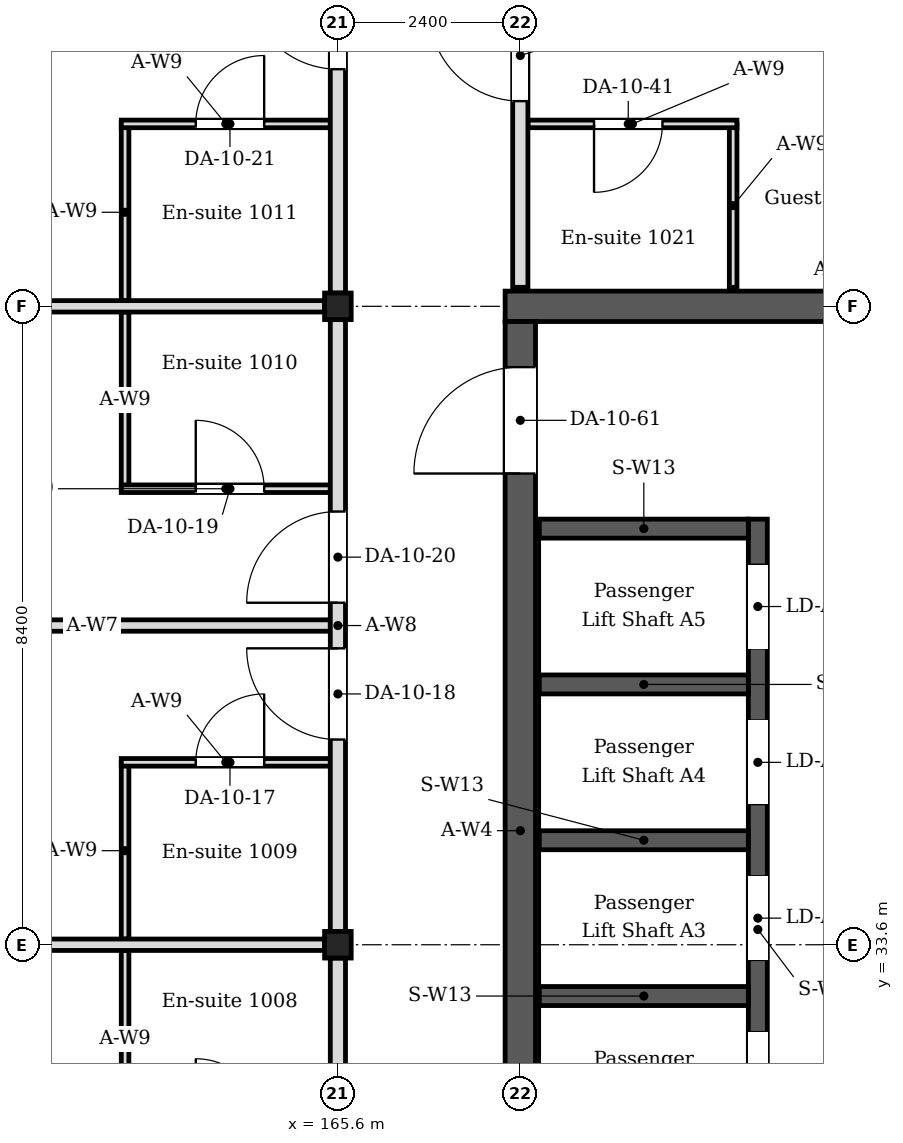
"""IFC4 building model, lengths in metres.
Left out: names, types, materials, properties, quantities, classifications, styles, units other than length and angle.
Written with IfcOpenShell. Run it as: python <this file> out.ifc"""

import sys

from ifc_helpers import new_model, si_unit, direction, frame, frame_2d, origin, origin_2d, place, context, subcontext, project, spatial, rectangle, i_section, extrude, element, fill, save


model = new_model("IFC4")
c1 = context("Model", 3, precision=1e-05, world=origin(), true_north=direction((0.0, 1.0)))
c2 = subcontext(c1, "Body", "Model", "MODEL_VIEW")
j1 = project(units=[si_unit("LENGTHUNIT", "METRE"), si_unit("PLANEANGLEUNIT", "RADIAN")], contexts=[c1])
p1 = place(None, origin())
s1 = spatial("IfcSite", under=j1, at=p1, CompositionType="ELEMENT")
p2 = place(p1, origin())
s2 = spatial("IfcBuilding", under=s1, at=p2, CompositionType="ELEMENT")
p3 = place(p2, frame((0.0, 0.0, 43.8)))
s3 = spatial("IfcBuildingStorey", under=s2, at=p3, CompositionType="ELEMENT", Elevation=43.8)
for number, where, z_axis, x_axis in (
    (1, (165.6, 33.6, 0.0), (0.0, 0.0, 1.0), (1.0, 0.0, 0.0)),
    (2, (165.6, 42.0, 0.0), (0.0, 0.0, 1.0), (1.0, 0.0, 0.0)),
):
    element("IfcColumn", number, at=place(p3, frame(where, z_axis=z_axis, x_axis=x_axis)), inside=s3, PredefinedType="COLUMN", context=c2, shape_type="SweptSolid", body=[
        extrude(i_section(OverallWidth=0.35, OverallDepth=0.35, WebThickness=0.012, FlangeThickness=0.019, FilletRadius=0.013, at=origin_2d()), origin(), (0.0, 0.0, 1.0), 4.2),
    ])
p4 = place(p3, frame((167.8, 42.0, 0.0), z_axis=(0.0, 0.0, 1.0), x_axis=(1.0, 0.0, 0.0)))
e3 = element("IfcWall", 3, at=p4, inside=s3, PredefinedType="SOLIDWALL", context=c2, shape_type="SweptSolid", body=[
    extrude(rectangle(XDim=8.8, YDim=0.4, at=frame_2d((4.4, 0.0))), origin(), (0.0, 0.0, 1.0), 4.05),
])
p5 = place(p3, frame((168.0, 25.4, 0.0), z_axis=(0.0, 0.0, 1.0), x_axis=(0.0, 1.0, 0.0)))
e4 = element("IfcWall", 4, at=p5, inside=s3, PredefinedType="SOLIDWALL", context=c2, shape_type="SweptSolid", body=[
    extrude(rectangle(XDim=16.4, YDim=0.4, at=frame_2d((8.2, 0.0))), origin(), (0.0, 0.0, 1.0), 4.05),
])
p6 = place(p5, frame((1.0, 0.0, 0.0)))
e5 = element("IfcOpeningElement", 5, at=p6, cuts=e4, PredefinedType="OPENING", context=c2, shape_type="SweptSolid", body=[
    extrude(rectangle(XDim=1.0, YDim=2.1, at=frame_2d((0.5, 1.05))), frame((0.0, 0.21, 0.0), z_axis=(0.0, -1.0, 0.0), x_axis=(1.0, 0.0, 0.0)), (0.0, 0.0, 1.0), 0.42),
])
p7 = place(p5, frame((14.4, 0.0, 0.0)))
e6 = element("IfcOpeningElement", 6, at=p7, cuts=e4, PredefinedType="OPENING", context=c2, shape_type="SweptSolid", body=[
    extrude(rectangle(XDim=1.4, YDim=2.1, at=frame_2d((0.7, 1.05))), frame((0.0, 0.21, 0.0), z_axis=(0.0, -1.0, 0.0), x_axis=(1.0, 0.0, 0.0)), (0.0, 0.0, 1.0), 0.42),
])
for number, where, z_axis, x_axis in (
    (7, (162.8, 31.2, 0.0), (0.0, 0.0, 1.0), (0.0, 1.0, 0.0)),
    (8, (162.8, 33.675, 0.0), (0.0, 0.0, 1.0), (0.0, 1.0, 0.0)),
):
    element("IfcWall", number, at=place(p3, frame(where, z_axis=z_axis, x_axis=x_axis)), inside=s3, PredefinedType="PARTITIONING", context=c2, shape_type="SweptSolid", body=[
        extrude(rectangle(XDim=2.325, YDim=0.1, at=frame_2d((1.163, 0.0))), origin(), (0.0, 0.0, 1.0), 4.05),
    ])
p8 = place(p3, frame((162.75, 36.0, 0.0), z_axis=(0.0, 0.0, 1.0), x_axis=(1.0, 0.0, 0.0)))
e9 = element("IfcWall", 9, at=p8, inside=s3, PredefinedType="PARTITIONING", context=c2, shape_type="SweptSolid", body=[
    extrude(rectangle(XDim=2.75, YDim=0.1, at=frame_2d((1.375, 0.0))), origin(), (0.0, 0.0, 1.0), 4.05),
])
p9 = place(p8, frame((0.98, 0.0, 0.0)))
e10 = element("IfcOpeningElement", 10, at=p9, cuts=e9, PredefinedType="OPENING", context=c2, shape_type="SweptSolid", body=[
    extrude(rectangle(XDim=0.9, YDim=2.1, at=frame_2d((0.45, 1.05))), frame((0.0, 0.06, 0.0), z_axis=(0.0, -1.0, 0.0), x_axis=(1.0, 0.0, 0.0)), (0.0, 0.0, 1.0), 0.12),
])
p10 = place(p3, frame((162.8, 39.6, 0.0), z_axis=(0.0, 0.0, 1.0), x_axis=(0.0, 1.0, 0.0)))
e11 = element("IfcWall", 11, at=p10, inside=s3, PredefinedType="PARTITIONING", context=c2, shape_type="SweptSolid", body=[
    extrude(rectangle(XDim=2.325, YDim=0.1, at=frame_2d((1.163, 0.0))), origin(), (0.0, 0.0, 1.0), 4.05),
])
p11 = place(p3, frame((162.75, 39.6, 0.0), z_axis=(0.0, 0.0, 1.0), x_axis=(1.0, 0.0, 0.0)))
e12 = element("IfcWall", 12, at=p11, inside=s3, PredefinedType="PARTITIONING", context=c2, shape_type="SweptSolid", body=[
    extrude(rectangle(XDim=2.75, YDim=0.1, at=frame_2d((1.375, 0.0))), origin(), (0.0, 0.0, 1.0), 4.05),
])
p12 = place(p11, frame((0.98, 0.0, 0.0)))
e13 = element("IfcOpeningElement", 13, at=p12, cuts=e12, PredefinedType="OPENING", context=c2, shape_type="SweptSolid", body=[
    extrude(rectangle(XDim=0.9, YDim=2.1, at=frame_2d((0.45, 1.05))), frame((0.0, 0.06, 0.0), z_axis=(0.0, -1.0, 0.0), x_axis=(1.0, 0.0, 0.0)), (0.0, 0.0, 1.0), 0.12),
])
p13 = place(p3, frame((162.8, 42.075, 0.0), z_axis=(0.0, 0.0, 1.0), x_axis=(0.0, 1.0, 0.0)))
e14 = element("IfcWall", 14, at=p13, inside=s3, PredefinedType="PARTITIONING", context=c2, shape_type="SweptSolid", body=[
    extrude(rectangle(XDim=2.325, YDim=0.1, at=frame_2d((1.163, 0.0))), origin(), (0.0, 0.0, 1.0), 4.05),
])
p14 = place(p3, frame((162.75, 44.4, 0.0), z_axis=(0.0, 0.0, 1.0), x_axis=(1.0, 0.0, 0.0)))
e15 = element("IfcWall", 15, at=p14, inside=s3, PredefinedType="PARTITIONING", context=c2, shape_type="SweptSolid", body=[
    extrude(rectangle(XDim=2.75, YDim=0.1, at=frame_2d((1.375, 0.0))), origin(), (0.0, 0.0, 1.0), 4.05),
])
p15 = place(p14, frame((0.98, 0.0, 0.0)))
e16 = element("IfcOpeningElement", 16, at=p15, cuts=e15, PredefinedType="OPENING", context=c2, shape_type="SweptSolid", body=[
    extrude(rectangle(XDim=0.9, YDim=2.1, at=frame_2d((0.45, 1.05))), frame((0.0, 0.06, 0.0), z_axis=(0.0, -1.0, 0.0), x_axis=(1.0, 0.0, 0.0)), (0.0, 0.0, 1.0), 0.12),
])
p16 = place(p3, frame((170.8, 42.25, 0.0), z_axis=(0.0, 0.0, 1.0), x_axis=(0.0, 1.0, 0.0)))
e17 = element("IfcWall", 17, at=p16, inside=s3, PredefinedType="PARTITIONING", context=c2, shape_type="SweptSolid", body=[
    extrude(rectangle(XDim=2.15, YDim=0.1, at=frame_2d((1.075, 0.0))), origin(), (0.0, 0.0, 1.0), 4.05),
])
p17 = place(p3, frame((170.85, 44.4, 0.0), z_axis=(0.0, 0.0, 1.0), x_axis=(-1.0, 0.0, 0.0)))
e18 = element("IfcWall", 18, at=p17, inside=s3, PredefinedType="PARTITIONING", context=c2, shape_type="SweptSolid", body=[
    extrude(rectangle(XDim=2.75, YDim=0.1, at=frame_2d((1.375, 0.0))), origin(), (0.0, 0.0, 1.0), 4.05),
])
p18 = place(p17, frame((0.98, 0.0, 0.0)))
e19 = element("IfcOpeningElement", 19, at=p18, cuts=e18, PredefinedType="OPENING", context=c2, shape_type="SweptSolid", body=[
    extrude(rectangle(XDim=0.9, YDim=2.1, at=frame_2d((0.45, 1.05))), frame((0.0, 0.06, 0.0), z_axis=(0.0, -1.0, 0.0), x_axis=(1.0, 0.0, 0.0)), (0.0, 0.0, 1.0), 0.12),
])
for number, where, z_axis, x_axis in (
    (20, (157.375, 33.6, 0.0), (0.0, 0.0, 1.0), (1.0, 0.0, 0.0)),
    (21, (157.375, 42.0, 0.0), (0.0, 0.0, 1.0), (1.0, 0.0, 0.0)),
):
    element("IfcWall", number, at=place(p3, frame(where, z_axis=z_axis, x_axis=x_axis)), inside=s3, PredefinedType="PARTITIONING", context=c2, shape_type="SweptSolid", body=[
        extrude(rectangle(XDim=8.05, YDim=0.15, at=frame_2d((4.025, 0.0))), origin(), (0.0, 0.0, 1.0), 3.604),
    ])
p19 = place(p3, frame((159.24, 37.8, 0.0), z_axis=(0.0, 0.0, 1.0), x_axis=(1.0, 0.0, 0.0)))
e22 = element("IfcWall", 22, at=p19, inside=s3, PredefinedType="PARTITIONING", context=c2, shape_type="SweptSolid", body=[
    extrude(rectangle(XDim=6.26, YDim=0.15, at=frame_2d((3.13, 0.0))), origin(), (0.0, 0.0, 1.0), 3.604),
])
p20 = place(p3, frame((165.6, 25.375, 0.0), z_axis=(0.0, 0.0, 1.0), x_axis=(0.0, 1.0, 0.0)))
e23 = element("IfcWall", 23, at=p20, inside=s3, PredefinedType="PARTITIONING", context=c2, shape_type="SweptSolid", body=[
    extrude(rectangle(XDim=8.05, YDim=0.2, at=frame_2d((4.025, 0.0))), origin(), (0.0, 0.0, 1.0), 3.45),
])
p21 = place(p20, frame((2.525, 0.0, 0.0)))
e24 = element("IfcOpeningElement", 24, at=p21, cuts=e23, PredefinedType="OPENING", context=c2, shape_type="SweptSolid", body=[
    extrude(rectangle(XDim=1.2, YDim=2.1, at=frame_2d((0.6, 1.05))), frame((0.0, 0.11, 0.0), z_axis=(0.0, -1.0, 0.0), x_axis=(1.0, 0.0, 0.0)), (0.0, 0.0, 1.0), 0.22),
])
p22 = place(p20, frame((4.325, 0.0, 0.0)))
e25 = element("IfcOpeningElement", 25, at=p22, cuts=e23, PredefinedType="OPENING", context=c2, shape_type="SweptSolid", body=[
    extrude(rectangle(XDim=1.2, YDim=2.1, at=frame_2d((0.6, 1.05))), frame((0.0, 0.11, 0.0), z_axis=(0.0, -1.0, 0.0), x_axis=(1.0, 0.0, 0.0)), (0.0, 0.0, 1.0), 0.22),
])
p23 = place(p3, frame((165.6, 33.775, 0.0), z_axis=(0.0, 0.0, 1.0), x_axis=(0.0, 1.0, 0.0)))
e26 = element("IfcWall", 26, at=p23, inside=s3, PredefinedType="PARTITIONING", context=c2, shape_type="SweptSolid", body=[
    extrude(rectangle(XDim=8.05, YDim=0.2, at=frame_2d((4.025, 0.0))), origin(), (0.0, 0.0, 1.0), 3.45),
])
p24 = place(p23, frame((2.525, 0.0, 0.0)))
e27 = element("IfcOpeningElement", 27, at=p24, cuts=e26, PredefinedType="OPENING", context=c2, shape_type="SweptSolid", body=[
    extrude(rectangle(XDim=1.2, YDim=2.1, at=frame_2d((0.6, 1.05))), frame((0.0, 0.11, 0.0), z_axis=(0.0, -1.0, 0.0), x_axis=(1.0, 0.0, 0.0)), (0.0, 0.0, 1.0), 0.22),
])
p25 = place(p23, frame((4.325, 0.0, 0.0)))
e28 = element("IfcOpeningElement", 28, at=p25, cuts=e26, PredefinedType="OPENING", context=c2, shape_type="SweptSolid", body=[
    extrude(rectangle(XDim=1.2, YDim=2.1, at=frame_2d((0.6, 1.05))), frame((0.0, 0.11, 0.0), z_axis=(0.0, -1.0, 0.0), x_axis=(1.0, 0.0, 0.0)), (0.0, 0.0, 1.0), 0.22),
])
p26 = place(p3, frame((165.6, 42.175, 0.0), z_axis=(0.0, 0.0, 1.0), x_axis=(0.0, 1.0, 0.0)))
e29 = element("IfcWall", 29, at=p26, inside=s3, PredefinedType="PARTITIONING", context=c2, shape_type="SweptSolid", body=[
    extrude(rectangle(XDim=8.05, YDim=0.2, at=frame_2d((4.025, 0.0))), origin(), (0.0, 0.0, 1.0), 3.45),
])
p27 = place(p26, frame((2.945, 0.0, 0.0)))
e30 = element("IfcOpeningElement", 30, at=p27, cuts=e29, PredefinedType="OPENING", context=c2, shape_type="SweptSolid", body=[
    extrude(rectangle(XDim=1.2, YDim=2.1, at=frame_2d((0.6, 1.05))), frame((0.0, 0.11, 0.0), z_axis=(0.0, -1.0, 0.0), x_axis=(1.0, 0.0, 0.0)), (0.0, 0.0, 1.0), 0.22),
])
p28 = place(p26, frame((4.945, 0.0, 0.0)))
e31 = element("IfcOpeningElement", 31, at=p28, cuts=e29, PredefinedType="OPENING", context=c2, shape_type="SweptSolid", body=[
    extrude(rectangle(XDim=1.2, YDim=2.1, at=frame_2d((0.6, 1.05))), frame((0.0, 0.11, 0.0), z_axis=(0.0, -1.0, 0.0), x_axis=(1.0, 0.0, 0.0)), (0.0, 0.0, 1.0), 0.22),
])
p29 = place(p3, frame((168.0, 42.25, 0.0), z_axis=(0.0, 0.0, 1.0), x_axis=(0.0, 1.0, 0.0)))
e32 = element("IfcWall", 32, at=p29, inside=s3, PredefinedType="PARTITIONING", context=c2, shape_type="SweptSolid", body=[
    extrude(rectangle(XDim=7.975, YDim=0.2, at=frame_2d((3.988, 0.0))), origin(), (0.0, 0.0, 1.0), 3.45),
])
p30 = place(p29, frame((2.45, 0.0, 0.0)))
e33 = element("IfcOpeningElement", 33, at=p30, cuts=e32, PredefinedType="OPENING", context=c2, shape_type="SweptSolid", body=[
    extrude(rectangle(XDim=1.2, YDim=2.1, at=frame_2d((0.6, 1.05))), frame((0.0, 0.11, 0.0), z_axis=(0.0, -1.0, 0.0), x_axis=(1.0, 0.0, 0.0)), (0.0, 0.0, 1.0), 0.22),
])
p31 = place(p29, frame((4.25, 0.0, 0.0)))
e34 = element("IfcOpeningElement", 34, at=p31, cuts=e32, PredefinedType="OPENING", context=c2, shape_type="SweptSolid", body=[
    extrude(rectangle(XDim=1.2, YDim=2.1, at=frame_2d((0.6, 1.05))), frame((0.0, 0.11, 0.0), z_axis=(0.0, -1.0, 0.0), x_axis=(1.0, 0.0, 0.0)), (0.0, 0.0, 1.0), 0.22),
])
p32 = place(p3, frame((171.125, 28.3, 0.0), z_axis=(0.0, 0.0, 1.0), x_axis=(0.0, 1.0, 0.0)))
e35 = element("IfcWall", 35, at=p32, inside=s3, PredefinedType="SOLIDWALL", context=c2, shape_type="SweptSolid", body=[
    extrude(rectangle(XDim=10.9, YDim=0.25, at=frame_2d((5.45, 0.0))), origin(), (0.0, 0.0, 1.0), 4.05),
])
p33 = place(p32, frame((0.8, 0.0, 0.0)))
e36 = element("IfcOpeningElement", 36, at=p33, cuts=e35, PredefinedType="OPENING", context=c2, shape_type="SweptSolid", body=[
    extrude(rectangle(XDim=1.1, YDim=2.1, at=frame_2d((0.55, 1.05))), frame((0.0, 0.135, 0.0), z_axis=(0.0, -1.0, 0.0), x_axis=(1.0, 0.0, 0.0)), (0.0, 0.0, 1.0), 0.27),
])
p34 = place(p32, frame((3.05, 0.0, 0.0)))
e37 = element("IfcOpeningElement", 37, at=p34, cuts=e35, PredefinedType="OPENING", context=c2, shape_type="SweptSolid", body=[
    extrude(rectangle(XDim=1.1, YDim=2.1, at=frame_2d((0.55, 1.05))), frame((0.0, 0.135, 0.0), z_axis=(0.0, -1.0, 0.0), x_axis=(1.0, 0.0, 0.0)), (0.0, 0.0, 1.0), 0.27),
])
p35 = place(p32, frame((5.1, 0.0, 0.0)))
e38 = element("IfcOpeningElement", 38, at=p35, cuts=e35, PredefinedType="OPENING", context=c2, shape_type="SweptSolid", body=[
    extrude(rectangle(XDim=1.1, YDim=2.1, at=frame_2d((0.55, 1.05))), frame((0.0, 0.135, 0.0), z_axis=(0.0, -1.0, 0.0), x_axis=(1.0, 0.0, 0.0)), (0.0, 0.0, 1.0), 0.27),
])
p36 = place(p32, frame((7.15, 0.0, 0.0)))
e39 = element("IfcOpeningElement", 39, at=p36, cuts=e35, PredefinedType="OPENING", context=c2, shape_type="SweptSolid", body=[
    extrude(rectangle(XDim=1.1, YDim=2.1, at=frame_2d((0.55, 1.05))), frame((0.0, 0.135, 0.0), z_axis=(0.0, -1.0, 0.0), x_axis=(1.0, 0.0, 0.0)), (0.0, 0.0, 1.0), 0.27),
])
p37 = place(p32, frame((9.2, 0.0, 0.0)))
e40 = element("IfcOpeningElement", 40, at=p37, cuts=e35, PredefinedType="OPENING", context=c2, shape_type="SweptSolid", body=[
    extrude(rectangle(XDim=1.1, YDim=2.1, at=frame_2d((0.55, 1.05))), frame((0.0, 0.135, 0.0), z_axis=(0.0, -1.0, 0.0), x_axis=(1.0, 0.0, 0.0)), (0.0, 0.0, 1.0), 0.27),
])
for number, where, z_axis, x_axis in (
    (41, (168.25, 32.925, 0.0), (0.0, 0.0, 1.0), (1.0, 0.0, 0.0)),
    (42, (168.25, 34.975, 0.0), (0.0, 0.0, 1.0), (1.0, 0.0, 0.0)),
    (43, (168.25, 37.025, 0.0), (0.0, 0.0, 1.0), (1.0, 0.0, 0.0)),
    (44, (168.25, 39.075, 0.0), (0.0, 0.0, 1.0), (1.0, 0.0, 0.0)),
):
    element("IfcWall", number, at=place(p3, frame(where, z_axis=z_axis, x_axis=x_axis)), inside=s3, PredefinedType="SOLIDWALL", context=c2, shape_type="SweptSolid", body=[
        extrude(rectangle(XDim=2.75, YDim=0.25, at=frame_2d((1.375, 0.0))), origin(), (0.0, 0.0, 1.0), 4.05),
    ])
p38 = place(p9, origin())
e45 = element("IfcDoor", 45, at=p38, inside=s3, OperationType="SINGLE_SWING_RIGHT", PredefinedType="DOOR", context=c2, shape_type="SweptSolid", body=[
    extrude(rectangle(XDim=0.9, YDim=2.1, at=frame_2d((0.45, 1.05))), frame((0.0, 0.025, 0.0), z_axis=(0.0, -1.0, 0.0), x_axis=(1.0, 0.0, 0.0)), (0.0, 0.0, 1.0), 0.05),
])
fill(e10, e45)
p39 = place(p24, origin())
e46 = element("IfcDoor", 46, at=p39, inside=s3, OperationType="SINGLE_SWING_RIGHT", PredefinedType="DOOR", context=c2, shape_type="SweptSolid", body=[
    extrude(rectangle(XDim=1.2, YDim=2.1, at=frame_2d((0.6, 1.05))), frame((0.0, 0.025, 0.0), z_axis=(0.0, -1.0, 0.0), x_axis=(1.0, 0.0, 0.0)), (0.0, 0.0, 1.0), 0.05),
])
fill(e27, e46)
p40 = place(p12, origin())
e47 = element("IfcDoor", 47, at=p40, inside=s3, OperationType="SINGLE_SWING_LEFT", PredefinedType="DOOR", context=c2, shape_type="SweptSolid", body=[
    extrude(rectangle(XDim=0.9, YDim=2.1, at=frame_2d((0.45, 1.05))), frame((0.0, 0.025, 0.0), z_axis=(0.0, -1.0, 0.0), x_axis=(1.0, 0.0, 0.0)), (0.0, 0.0, 1.0), 0.05),
])
fill(e13, e47)
p41 = place(p25, origin())
e48 = element("IfcDoor", 48, at=p41, inside=s3, OperationType="SINGLE_SWING_LEFT", PredefinedType="DOOR", context=c2, shape_type="SweptSolid", body=[
    extrude(rectangle(XDim=1.2, YDim=2.1, at=frame_2d((0.6, 1.05))), frame((0.0, 0.025, 0.0), z_axis=(0.0, -1.0, 0.0), x_axis=(1.0, 0.0, 0.0)), (0.0, 0.0, 1.0), 0.05),
])
fill(e28, e48)
p42 = place(p15, origin())
e49 = element("IfcDoor", 49, at=p42, inside=s3, OperationType="SINGLE_SWING_RIGHT", PredefinedType="DOOR", context=c2, shape_type="SweptSolid", body=[
    extrude(rectangle(XDim=0.9, YDim=2.1, at=frame_2d((0.45, 1.05))), frame((0.0, 0.025, 0.0), z_axis=(0.0, -1.0, 0.0), x_axis=(1.0, 0.0, 0.0)), (0.0, 0.0, 1.0), 0.05),
])
fill(e16, e49)
p43 = place(p27, origin())
e50 = element("IfcDoor", 50, at=p43, inside=s3, OperationType="SINGLE_SWING_RIGHT", PredefinedType="DOOR", context=c2, shape_type="SweptSolid", body=[
    extrude(rectangle(XDim=1.2, YDim=2.1, at=frame_2d((0.6, 1.05))), frame((0.0, 0.025, 0.0), z_axis=(0.0, -1.0, 0.0), x_axis=(1.0, 0.0, 0.0)), (0.0, 0.0, 1.0), 0.05),
])
fill(e30, e50)
p44 = place(p18, origin())
e51 = element("IfcDoor", 51, at=p44, inside=s3, OperationType="SINGLE_SWING_RIGHT", PredefinedType="DOOR", context=c2, shape_type="SweptSolid", body=[
    extrude(rectangle(XDim=0.9, YDim=2.1, at=frame_2d((0.45, 1.05))), frame((0.0, 0.025, 0.0), z_axis=(0.0, -1.0, 0.0), x_axis=(1.0, 0.0, 0.0)), (0.0, 0.0, 1.0), 0.05),
])
fill(e19, e51)
p45 = place(p30, origin())
e52 = element("IfcDoor", 52, at=p45, inside=s3, OperationType="SINGLE_SWING_RIGHT", PredefinedType="DOOR", context=c2, shape_type="SweptSolid", body=[
    extrude(rectangle(XDim=1.2, YDim=2.1, at=frame_2d((0.6, 1.05))), frame((0.0, 0.025, 0.0), z_axis=(0.0, -1.0, 0.0), x_axis=(1.0, 0.0, 0.0)), (0.0, 0.0, 1.0), 0.05),
])
fill(e33, e52)
p46 = place(p34, origin())
e53 = element("IfcDoor", 53, at=p46, inside=s3, OperationType="SLIDING_TO_LEFT", PredefinedType="DOOR", context=c2, shape_type="SweptSolid", body=[
    extrude(rectangle(XDim=1.1, YDim=2.1, at=frame_2d((0.55, 1.05))), frame((0.0, 0.025, 0.0), z_axis=(0.0, -1.0, 0.0), x_axis=(1.0, 0.0, 0.0)), (0.0, 0.0, 1.0), 0.05),
])
fill(e37, e53)
p47 = place(p35, origin())
e54 = element("IfcDoor", 54, at=p47, inside=s3, OperationType="SLIDING_TO_LEFT", PredefinedType="DOOR", context=c2, shape_type="SweptSolid", body=[
    extrude(rectangle(XDim=1.1, YDim=2.1, at=frame_2d((0.55, 1.05))), frame((0.0, 0.025, 0.0), z_axis=(0.0, -1.0, 0.0), x_axis=(1.0, 0.0, 0.0)), (0.0, 0.0, 1.0), 0.05),
])
fill(e38, e54)
p48 = place(p36, origin())
e55 = element("IfcDoor", 55, at=p48, inside=s3, OperationType="SLIDING_TO_LEFT", PredefinedType="DOOR", context=c2, shape_type="SweptSolid", body=[
    extrude(rectangle(XDim=1.1, YDim=2.1, at=frame_2d((0.55, 1.05))), frame((0.0, 0.025, 0.0), z_axis=(0.0, -1.0, 0.0), x_axis=(1.0, 0.0, 0.0)), (0.0, 0.0, 1.0), 0.05),
])
fill(e39, e55)
p49 = place(p37, origin())
e56 = element("IfcDoor", 56, at=p49, inside=s3, OperationType="SLIDING_TO_LEFT", PredefinedType="DOOR", context=c2, shape_type="SweptSolid", body=[
    extrude(rectangle(XDim=1.1, YDim=2.1, at=frame_2d((0.55, 1.05))), frame((0.0, 0.025, 0.0), z_axis=(0.0, -1.0, 0.0), x_axis=(1.0, 0.0, 0.0)), (0.0, 0.0, 1.0), 0.05),
])
fill(e40, e56)
p50 = place(p7, origin())
e57 = element("IfcDoor", 57, at=p50, inside=s3, OperationType="DOUBLE_DOOR_DOUBLE_SWING", PredefinedType="DOOR", context=c2, shape_type="SweptSolid", body=[
    extrude(rectangle(XDim=1.4, YDim=2.1, at=frame_2d((0.7, 1.05))), frame((0.0, 0.025, 0.0), z_axis=(0.0, -1.0, 0.0), x_axis=(1.0, 0.0, 0.0)), (0.0, 0.0, 1.0), 0.05),
])
fill(e6, e57)
save(model, sys.argv[1])
